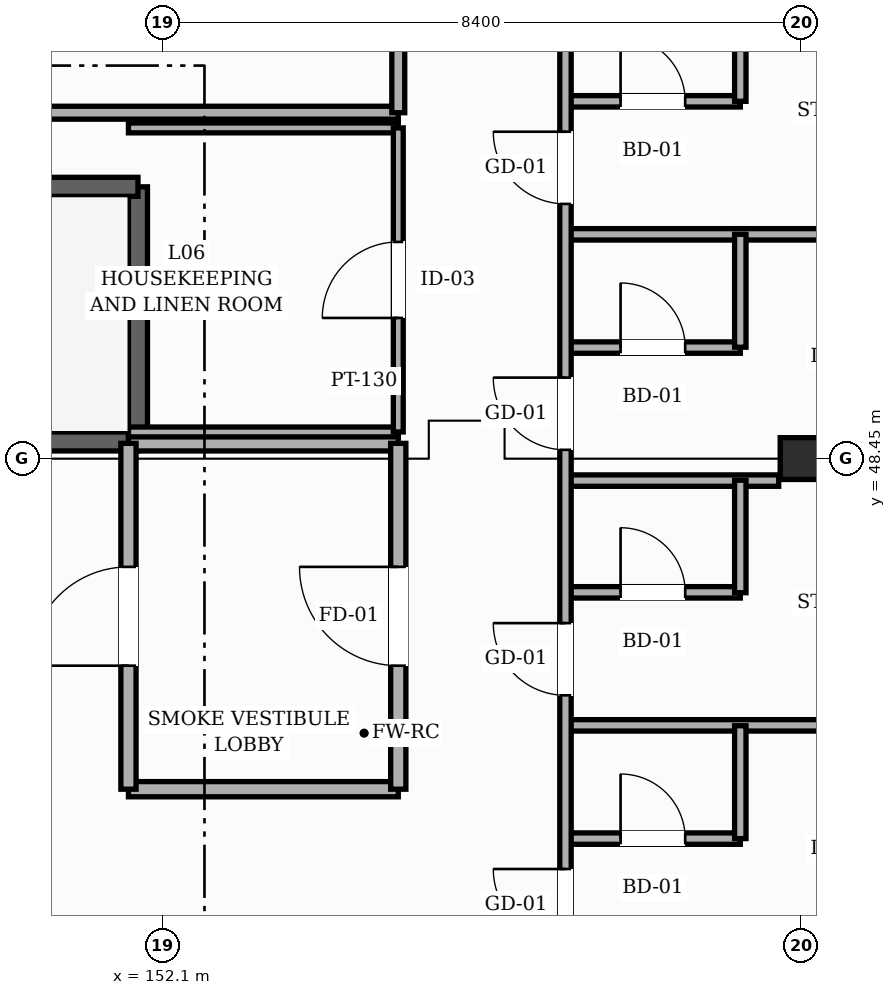
"""IFC4 building model, lengths in metres.
Left out: names, types, materials, properties, quantities, classifications, styles, units other than length and angle.
Written with IfcOpenShell. Run it as: python <this file> out.ifc"""

import sys

from ifc_helpers import new_model, si_unit, direction, frame, frame_2d, origin, origin_2d, place, context, subcontext, project, spatial, rectangle, hollow_rectangle, extrude, element, fill, save


model = new_model("IFC4")
c1 = context("Model", 3, precision=1e-05, world=origin(), true_north=direction((0.0, 1.0)))
c2 = subcontext(c1, "Body", "Model", "MODEL_VIEW")
j1 = project(units=[si_unit("LENGTHUNIT", "METRE"), si_unit("PLANEANGLEUNIT", "RADIAN")], contexts=[c1])
p1 = place(None, origin())
s1 = spatial("IfcSite", under=j1, at=p1, CompositionType="ELEMENT")
p2 = place(p1, origin())
s2 = spatial("IfcBuilding", under=s1, at=p2, CompositionType="ELEMENT")
p3 = place(p2, frame((0.0, 0.0, 28.2)))
s3 = spatial("IfcBuildingStorey", under=s2, at=p3, CompositionType="ELEMENT", Elevation=28.2)
p4 = place(p3, frame((160.5, 48.45, 0.0), z_axis=(0.0, 0.0, 1.0), x_axis=(1.0, 0.0, 0.0)))
e1 = element("IfcColumn", 1, at=p4, inside=s3, PredefinedType="COLUMN", context=c2, shape_type="SweptSolid", body=[
    extrude(hollow_rectangle(XDim=0.55, YDim=0.55, WallThickness=0.022, InnerFilletRadius=0.022, OuterFilletRadius=0.044, at=origin_2d()), origin(), (0.0, 0.0, 1.0), 3.6),
])
p5 = place(p3, frame((151.775, 52.025, 0.0), z_axis=(0.0, 0.0, 1.0), x_axis=(0.0, -1.0, 0.0)))
e2 = element("IfcWall", 2, at=p5, inside=s3, PredefinedType="SHEAR", context=c2, shape_type="SweptSolid", body=[
    extrude(rectangle(XDim=3.35, YDim=0.25, at=frame_2d((1.675, 0.0))), origin(), (0.0, 0.0, 1.0), 3.38),
])
p6 = place(p3, frame((151.775, 48.675, 0.0), z_axis=(0.0, 0.0, 1.0), x_axis=(-1.0, 0.0, 0.0)))
e3 = element("IfcWall", 3, at=p6, inside=s3, PredefinedType="SHEAR", context=c2, shape_type="SweptSolid", body=[
    extrude(rectangle(XDim=7.9, YDim=0.25, at=frame_2d((3.95, 0.0))), origin(), (0.0, 0.0, 1.0), 3.38),
])
p7 = place(p6, frame((6.075, 0.0, 0.0)))
e4 = element("IfcOpeningElement", 4, at=p7, cuts=e3, PredefinedType="OPENING", context=c2, shape_type="SweptSolid", body=[
    extrude(rectangle(XDim=1.3, YDim=2.2, at=frame_2d((0.65, 1.1))), frame((0.0, 0.135, 0.0), z_axis=(0.0, -1.0, 0.0), x_axis=(1.0, 0.0, 0.0)), (0.0, 0.0, 1.0), 0.27),
])
p8 = place(p3, frame((143.875, 52.025, 0.0), z_axis=(0.0, 0.0, 1.0), x_axis=(1.0, 0.0, 0.0)))
e5 = element("IfcWall", 5, at=p8, inside=s3, PredefinedType="SHEAR", context=c2, shape_type="SweptSolid", body=[
    extrude(rectangle(XDim=7.9, YDim=0.25, at=frame_2d((3.95, 0.0))), origin(), (0.0, 0.0, 1.0), 3.38),
])
p9 = place(p3, frame((157.4, 43.45, 0.0), z_axis=(0.0, 0.0, 1.0), x_axis=(1.0, 0.0, 0.0)))
e6 = element("IfcWall", 6, at=p9, inside=s3, PredefinedType="PARTITIONING", context=c2, shape_type="SweptSolid", body=[
    extrude(rectangle(XDim=2.3, YDim=0.15, at=frame_2d((1.15, 0.0))), origin(), (0.0, 0.0, 1.0), 3.365),
])
p10 = place(p9, frame((0.725, 0.0, 0.0)))
e7 = element("IfcOpeningElement", 7, at=p10, cuts=e6, PredefinedType="OPENING", context=c2, shape_type="SweptSolid", body=[
    extrude(rectangle(XDim=0.85, YDim=2.1, at=frame_2d((0.425, 1.05))), frame((0.0, 0.085, 0.0), z_axis=(0.0, -1.0, 0.0), x_axis=(1.0, 0.0, 0.0)), (0.0, 0.0, 1.0), 0.17),
])
p11 = place(p3, frame((151.65, 44.1, 0.0), z_axis=(0.0, 0.0, 1.0), x_axis=(1.0, 0.0, 0.0)))
e8 = element("IfcWall", 8, at=p11, inside=s3, PredefinedType="SOLIDWALL", context=c2, shape_type="SweptSolid", body=[
    extrude(rectangle(XDim=3.55, YDim=0.2, at=frame_2d((1.775, 0.0))), origin(), (0.0, 0.0, 1.0), 3.365),
])
p12 = place(p3, frame((157.4, 44.94, 0.0), z_axis=(0.0, 0.0, 1.0), x_axis=(1.0, 0.0, 0.0)))
e9 = element("IfcWall", 9, at=p12, inside=s3, PredefinedType="PARTITIONING", context=c2, shape_type="SweptSolid", body=[
    extrude(rectangle(XDim=9.8, YDim=0.15, at=frame_2d((4.9, 0.0))), origin(), (0.0, 0.0, 1.0), 3.055),
])
p13 = place(p3, frame((157.4, 46.69, 0.0), z_axis=(0.0, 0.0, 1.0), x_axis=(1.0, 0.0, 0.0)))
e10 = element("IfcWall", 10, at=p13, inside=s3, PredefinedType="PARTITIONING", context=c2, shape_type="SweptSolid", body=[
    extrude(rectangle(XDim=2.3, YDim=0.15, at=frame_2d((1.15, 0.0))), origin(), (0.0, 0.0, 1.0), 3.365),
])
p14 = place(p13, frame((0.725, 0.0, 0.0)))
e11 = element("IfcOpeningElement", 11, at=p14, cuts=e10, PredefinedType="OPENING", context=c2, shape_type="SweptSolid", body=[
    extrude(rectangle(XDim=0.85, YDim=2.1, at=frame_2d((0.425, 1.05))), frame((0.0, 0.085, 0.0), z_axis=(0.0, -1.0, 0.0), x_axis=(1.0, 0.0, 0.0)), (0.0, 0.0, 1.0), 0.17),
])
p15 = place(p3, frame((157.4, 48.16, 0.0), z_axis=(0.0, 0.0, 1.0), x_axis=(1.0, 0.0, 0.0)))
e12 = element("IfcWall", 12, at=p15, inside=s3, PredefinedType="PARTITIONING", context=c2, shape_type="SweptSolid", body=[
    extrude(rectangle(XDim=2.805, YDim=0.15, at=frame_2d((1.403, 0.0))), origin(), (0.0, 0.0, 1.0), 3.365),
])
p16 = place(p3, frame((151.65, 48.65, 0.0), z_axis=(0.0, 0.0, 1.0), x_axis=(1.0, 0.0, 0.0)))
e13 = element("IfcWall", 13, at=p16, inside=s3, PredefinedType="SOLIDWALL", context=c2, shape_type="SweptSolid", body=[
    extrude(rectangle(XDim=3.55, YDim=0.2, at=frame_2d((1.775, 0.0))), origin(), (0.0, 0.0, 1.0), 3.365),
])
p17 = place(p3, frame((151.65, 48.8, 0.0), z_axis=(0.0, 0.0, 1.0), x_axis=(1.0, 0.0, 0.0)))
e14 = element("IfcWall", 14, at=p17, inside=s3, PredefinedType="PARTITIONING", context=c2, shape_type="SweptSolid", body=[
    extrude(rectangle(XDim=3.55, YDim=0.13, at=frame_2d((1.775, 0.0))), origin(), (0.0, 0.0, 1.0), 3.365),
])
p18 = place(p3, frame((157.4, 49.91, 0.0), z_axis=(0.0, 0.0, 1.0), x_axis=(1.0, 0.0, 0.0)))
e15 = element("IfcWall", 15, at=p18, inside=s3, PredefinedType="PARTITIONING", context=c2, shape_type="SweptSolid", body=[
    extrude(rectangle(XDim=2.3, YDim=0.15, at=frame_2d((1.15, 0.0))), origin(), (0.0, 0.0, 1.0), 3.365),
])
p19 = place(p18, frame((0.725, 0.0, 0.0)))
e16 = element("IfcOpeningElement", 16, at=p19, cuts=e15, PredefinedType="OPENING", context=c2, shape_type="SweptSolid", body=[
    extrude(rectangle(XDim=0.85, YDim=2.1, at=frame_2d((0.425, 1.05))), frame((0.0, 0.085, 0.0), z_axis=(0.0, -1.0, 0.0), x_axis=(1.0, 0.0, 0.0)), (0.0, 0.0, 1.0), 0.17),
])
p20 = place(p3, frame((157.4, 51.4, 0.0), z_axis=(0.0, 0.0, 1.0), x_axis=(1.0, 0.0, 0.0)))
e17 = element("IfcWall", 17, at=p20, inside=s3, PredefinedType="PARTITIONING", context=c2, shape_type="SweptSolid", body=[
    extrude(rectangle(XDim=9.8, YDim=0.15, at=frame_2d((4.9, 0.0))), origin(), (0.0, 0.0, 1.0), 3.365),
])
p21 = place(p3, frame((151.65, 52.8, 0.0), z_axis=(0.0, 0.0, 1.0), x_axis=(1.0, 0.0, 0.0)))
e18 = element("IfcWall", 18, at=p21, inside=s3, PredefinedType="PARTITIONING", context=c2, shape_type="SweptSolid", body=[
    extrude(rectangle(XDim=3.55, YDim=0.13, at=frame_2d((1.775, 0.0))), origin(), (0.0, 0.0, 1.0), 3.365),
])
p22 = place(p3, frame((144.8, 53.0, 0.0), z_axis=(0.0, 0.0, 1.0), x_axis=(1.0, 0.0, 0.0)))
e19 = element("IfcWall", 19, at=p22, inside=s3, PredefinedType="PARTITIONING", context=c2, shape_type="SweptSolid", body=[
    extrude(rectangle(XDim=10.4, YDim=0.17, at=frame_2d((5.2, 0.0))), origin(), (0.0, 0.0, 1.0), 3.365),
])
p23 = place(p3, frame((157.4, 53.15, 0.0), z_axis=(0.0, 0.0, 1.0), x_axis=(1.0, 0.0, 0.0)))
e20 = element("IfcWall", 20, at=p23, inside=s3, PredefinedType="PARTITIONING", context=c2, shape_type="SweptSolid", body=[
    extrude(rectangle(XDim=2.3, YDim=0.15, at=frame_2d((1.15, 0.0))), origin(), (0.0, 0.0, 1.0), 3.365),
])
p24 = place(p23, frame((0.725, 0.0, 0.0)))
e21 = element("IfcOpeningElement", 21, at=p24, cuts=e20, PredefinedType="OPENING", context=c2, shape_type="SweptSolid", body=[
    extrude(rectangle(XDim=0.85, YDim=2.1, at=frame_2d((0.425, 1.05))), frame((0.0, 0.085, 0.0), z_axis=(0.0, -1.0, 0.0), x_axis=(1.0, 0.0, 0.0)), (0.0, 0.0, 1.0), 0.17),
])
p25 = place(p3, frame((151.65, 44.1, 0.0), z_axis=(0.0, 0.0, 1.0), x_axis=(0.0, 1.0, 0.0)))
e22 = element("IfcWall", 22, at=p25, inside=s3, PredefinedType="SOLIDWALL", context=c2, shape_type="SweptSolid", body=[
    extrude(rectangle(XDim=4.55, YDim=0.2, at=frame_2d((2.275, 0.0))), origin(), (0.0, 0.0, 1.0), 3.365),
])
p26 = place(p25, frame((1.625, 0.0, 0.0)))
e23 = element("IfcOpeningElement", 23, at=p26, cuts=e22, PredefinedType="OPENING", context=c2, shape_type="SweptSolid", body=[
    extrude(rectangle(XDim=1.3, YDim=2.2, at=frame_2d((0.65, 1.1))), frame((0.0, 0.11, 0.0), z_axis=(0.0, -1.0, 0.0), x_axis=(1.0, 0.0, 0.0)), (0.0, 0.0, 1.0), 0.22),
])
p27 = place(p3, frame((155.2, 44.1, 0.0), z_axis=(0.0, 0.0, 1.0), x_axis=(0.0, 1.0, 0.0)))
e24 = element("IfcWall", 24, at=p27, inside=s3, PredefinedType="SOLIDWALL", context=c2, shape_type="SweptSolid", body=[
    extrude(rectangle(XDim=4.55, YDim=0.2, at=frame_2d((2.275, 0.0))), origin(), (0.0, 0.0, 1.0), 3.365),
])
p28 = place(p27, frame((1.625, 0.0, 0.0)))
e25 = element("IfcOpeningElement", 25, at=p28, cuts=e24, PredefinedType="OPENING", context=c2, shape_type="SweptSolid", body=[
    extrude(rectangle(XDim=1.3, YDim=2.2, at=frame_2d((0.65, 1.1))), frame((0.0, 0.11, 0.0), z_axis=(0.0, -1.0, 0.0), x_axis=(1.0, 0.0, 0.0)), (0.0, 0.0, 1.0), 0.22),
])
p29 = place(p3, frame((155.2, 48.8, 0.0), z_axis=(0.0, 0.0, 1.0), x_axis=(0.0, 1.0, 0.0)))
e26 = element("IfcWall", 26, at=p29, inside=s3, PredefinedType="PARTITIONING", context=c2, shape_type="SweptSolid", body=[
    extrude(rectangle(XDim=4.0, YDim=0.13, at=frame_2d((2.0, 0.0))), origin(), (0.0, 0.0, 1.0), 3.365),
])
p30 = place(p29, frame((1.5, 0.0, 0.0)))
e27 = element("IfcOpeningElement", 27, at=p30, cuts=e26, PredefinedType="OPENING", context=c2, shape_type="SweptSolid", body=[
    extrude(rectangle(XDim=1.0, YDim=2.18, at=frame_2d((0.5, 1.09))), frame((0.0, 0.075, 0.0), z_axis=(0.0, -1.0, 0.0), x_axis=(1.0, 0.0, 0.0)), (0.0, 0.0, 1.0), 0.15),
])
p31 = place(p3, frame((155.2, 53.0, 0.0), z_axis=(0.0, 0.0, 1.0), x_axis=(0.0, 1.0, 0.0)))
e28 = element("IfcWall", 28, at=p31, inside=s3, PredefinedType="PARTITIONING", context=c2, shape_type="SweptSolid", body=[
    extrude(rectangle(XDim=6.45, YDim=0.17, at=frame_2d((3.225, 0.0))), origin(), (0.0, 0.0, 1.0), 3.365),
])
p32 = place(p31, frame((2.625, 0.0, 0.0)))
e29 = element("IfcOpeningElement", 29, at=p32, cuts=e28, PredefinedType="OPENING", context=c2, shape_type="SweptSolid", body=[
    extrude(rectangle(XDim=1.2, YDim=2.2, at=frame_2d((0.6, 1.1))), frame((0.0, 0.095, 0.0), z_axis=(0.0, -1.0, 0.0), x_axis=(1.0, 0.0, 0.0)), (0.0, 0.0, 1.0), 0.19),
])
p33 = place(p3, frame((157.4, 22.3, 0.0), z_axis=(0.0, 0.0, 1.0), x_axis=(0.0, 1.0, 0.0)))
e30 = element("IfcWall", 30, at=p33, inside=s3, PredefinedType="PARTITIONING", context=c2, shape_type="SweptSolid", body=[
    extrude(rectangle(XDim=48.5, YDim=0.15, at=frame_2d((24.25, 0.0))), origin(), (0.0, 0.0, 1.0), 3.365),
])
p34 = place(p33, frame((0.325, 0.0, 0.0)))
e31 = element("IfcOpeningElement", 31, at=p34, cuts=e30, PredefinedType="OPENING", context=c2, shape_type="SweptSolid", body=[
    extrude(rectangle(XDim=1.1, YDim=2.2, at=frame_2d((0.55, 1.1))), frame((0.0, 0.085, 0.0), z_axis=(0.0, -1.0, 0.0), x_axis=(1.0, 0.0, 0.0)), (0.0, 0.0, 1.0), 0.17),
])
p35 = place(p33, frame((3.635, 0.0, 0.0)))
e32 = element("IfcOpeningElement", 32, at=p35, cuts=e30, PredefinedType="OPENING", context=c2, shape_type="SweptSolid", body=[
    extrude(rectangle(XDim=0.95, YDim=2.15, at=frame_2d((0.475, 1.075))), frame((0.0, 0.085, 0.0), z_axis=(0.0, -1.0, 0.0), x_axis=(1.0, 0.0, 0.0)), (0.0, 0.0, 1.0), 0.17),
])
p36 = place(p33, frame((6.865, 0.0, 0.0)))
e33 = element("IfcOpeningElement", 33, at=p36, cuts=e30, PredefinedType="OPENING", context=c2, shape_type="SweptSolid", body=[
    extrude(rectangle(XDim=0.95, YDim=2.15, at=frame_2d((0.475, 1.075))), frame((0.0, 0.085, 0.0), z_axis=(0.0, -1.0, 0.0), x_axis=(1.0, 0.0, 0.0)), (0.0, 0.0, 1.0), 0.17),
])
p37 = place(p33, frame((10.1, 0.0, 0.0)))
e34 = element("IfcOpeningElement", 34, at=p37, cuts=e30, PredefinedType="OPENING", context=c2, shape_type="SweptSolid", body=[
    extrude(rectangle(XDim=0.95, YDim=2.15, at=frame_2d((0.475, 1.075))), frame((0.0, 0.085, 0.0), z_axis=(0.0, -1.0, 0.0), x_axis=(1.0, 0.0, 0.0)), (0.0, 0.0, 1.0), 0.17),
])
p38 = place(p33, frame((13.335, 0.0, 0.0)))
e35 = element("IfcOpeningElement", 35, at=p38, cuts=e30, PredefinedType="OPENING", context=c2, shape_type="SweptSolid", body=[
    extrude(rectangle(XDim=0.95, YDim=2.15, at=frame_2d((0.475, 1.075))), frame((0.0, 0.085, 0.0), z_axis=(0.0, -1.0, 0.0), x_axis=(1.0, 0.0, 0.0)), (0.0, 0.0, 1.0), 0.17),
])
p39 = place(p33, frame((16.565, 0.0, 0.0)))
e36 = element("IfcOpeningElement", 36, at=p39, cuts=e30, PredefinedType="OPENING", context=c2, shape_type="SweptSolid", body=[
    extrude(rectangle(XDim=0.95, YDim=2.15, at=frame_2d((0.475, 1.075))), frame((0.0, 0.085, 0.0), z_axis=(0.0, -1.0, 0.0), x_axis=(1.0, 0.0, 0.0)), (0.0, 0.0, 1.0), 0.17),
])
p40 = place(p33, frame((19.8, 0.0, 0.0)))
e37 = element("IfcOpeningElement", 37, at=p40, cuts=e30, PredefinedType="OPENING", context=c2, shape_type="SweptSolid", body=[
    extrude(rectangle(XDim=0.95, YDim=2.15, at=frame_2d((0.475, 1.075))), frame((0.0, 0.085, 0.0), z_axis=(0.0, -1.0, 0.0), x_axis=(1.0, 0.0, 0.0)), (0.0, 0.0, 1.0), 0.17),
])
p41 = place(p33, frame((23.035, 0.0, 0.0)))
e38 = element("IfcOpeningElement", 38, at=p41, cuts=e30, PredefinedType="OPENING", context=c2, shape_type="SweptSolid", body=[
    extrude(rectangle(XDim=0.95, YDim=2.15, at=frame_2d((0.475, 1.075))), frame((0.0, 0.085, 0.0), z_axis=(0.0, -1.0, 0.0), x_axis=(1.0, 0.0, 0.0)), (0.0, 0.0, 1.0), 0.17),
])
p42 = place(p33, frame((26.265, 0.0, 0.0)))
e39 = element("IfcOpeningElement", 39, at=p42, cuts=e30, PredefinedType="OPENING", context=c2, shape_type="SweptSolid", body=[
    extrude(rectangle(XDim=0.95, YDim=2.15, at=frame_2d((0.475, 1.075))), frame((0.0, 0.085, 0.0), z_axis=(0.0, -1.0, 0.0), x_axis=(1.0, 0.0, 0.0)), (0.0, 0.0, 1.0), 0.17),
])
p43 = place(p33, frame((29.5, 0.0, 0.0)))
e40 = element("IfcOpeningElement", 40, at=p43, cuts=e30, PredefinedType="OPENING", context=c2, shape_type="SweptSolid", body=[
    extrude(rectangle(XDim=0.95, YDim=2.15, at=frame_2d((0.475, 1.075))), frame((0.0, 0.085, 0.0), z_axis=(0.0, -1.0, 0.0), x_axis=(1.0, 0.0, 0.0)), (0.0, 0.0, 1.0), 0.17),
])
p44 = place(p33, frame((32.735, 0.0, 0.0)))
e41 = element("IfcOpeningElement", 41, at=p44, cuts=e30, PredefinedType="OPENING", context=c2, shape_type="SweptSolid", body=[
    extrude(rectangle(XDim=0.95, YDim=2.15, at=frame_2d((0.475, 1.075))), frame((0.0, 0.085, 0.0), z_axis=(0.0, -1.0, 0.0), x_axis=(1.0, 0.0, 0.0)), (0.0, 0.0, 1.0), 0.17),
])
p45 = place(p33, frame((35.965, 0.0, 0.0)))
e42 = element("IfcOpeningElement", 42, at=p45, cuts=e30, PredefinedType="OPENING", context=c2, shape_type="SweptSolid", body=[
    extrude(rectangle(XDim=0.95, YDim=2.15, at=frame_2d((0.475, 1.075))), frame((0.0, 0.085, 0.0), z_axis=(0.0, -1.0, 0.0), x_axis=(1.0, 0.0, 0.0)), (0.0, 0.0, 1.0), 0.17),
])
p46 = place(p33, frame((39.2, 0.0, 0.0)))
e43 = element("IfcOpeningElement", 43, at=p46, cuts=e30, PredefinedType="OPENING", context=c2, shape_type="SweptSolid", body=[
    extrude(rectangle(XDim=0.95, YDim=2.15, at=frame_2d((0.475, 1.075))), frame((0.0, 0.085, 0.0), z_axis=(0.0, -1.0, 0.0), x_axis=(1.0, 0.0, 0.0)), (0.0, 0.0, 1.0), 0.17),
])
p47 = place(p33, frame((42.435, 0.0, 0.0)))
e44 = element("IfcOpeningElement", 44, at=p47, cuts=e30, PredefinedType="OPENING", context=c2, shape_type="SweptSolid", body=[
    extrude(rectangle(XDim=0.95, YDim=2.15, at=frame_2d((0.475, 1.075))), frame((0.0, 0.085, 0.0), z_axis=(0.0, -1.0, 0.0), x_axis=(1.0, 0.0, 0.0)), (0.0, 0.0, 1.0), 0.17),
])
p48 = place(p33, frame((45.665, 0.0, 0.0)))
e45 = element("IfcOpeningElement", 45, at=p48, cuts=e30, PredefinedType="OPENING", context=c2, shape_type="SweptSolid", body=[
    extrude(rectangle(XDim=0.95, YDim=2.15, at=frame_2d((0.475, 1.075))), frame((0.0, 0.085, 0.0), z_axis=(0.0, -1.0, 0.0), x_axis=(1.0, 0.0, 0.0)), (0.0, 0.0, 1.0), 0.17),
])
p49 = place(p3, frame((159.7, 43.45, 0.0), z_axis=(0.0, 0.0, 1.0), x_axis=(0.0, 1.0, 0.0)))
e46 = element("IfcWall", 46, at=p49, inside=s3, PredefinedType="PARTITIONING", context=c2, shape_type="SweptSolid", body=[
    extrude(rectangle(XDim=1.485, YDim=0.15, at=frame_2d((0.743, 0.0))), origin(), (0.0, 0.0, 1.0), 3.365),
])
p50 = place(p3, frame((159.7, 46.685, 0.0), z_axis=(0.0, 0.0, 1.0), x_axis=(0.0, 1.0, 0.0)))
e47 = element("IfcWall", 47, at=p50, inside=s3, PredefinedType="PARTITIONING", context=c2, shape_type="SweptSolid", body=[
    extrude(rectangle(XDim=1.48, YDim=0.15, at=frame_2d((0.74, 0.0))), origin(), (0.0, 0.0, 1.0), 3.365),
])
p51 = place(p3, frame((159.7, 49.915, 0.0), z_axis=(0.0, 0.0, 1.0), x_axis=(0.0, 1.0, 0.0)))
e48 = element("IfcWall", 48, at=p51, inside=s3, PredefinedType="PARTITIONING", context=c2, shape_type="SweptSolid", body=[
    extrude(rectangle(XDim=1.485, YDim=0.15, at=frame_2d((0.742, 0.0))), origin(), (0.0, 0.0, 1.0), 3.365),
])
p52 = place(p3, frame((159.7, 53.15, 0.0), z_axis=(0.0, 0.0, 1.0), x_axis=(0.0, 1.0, 0.0)))
e49 = element("IfcWall", 49, at=p52, inside=s3, PredefinedType="PARTITIONING", context=c2, shape_type="SweptSolid", body=[
    extrude(rectangle(XDim=1.485, YDim=0.15, at=frame_2d((0.743, 0.0))), origin(), (0.0, 0.0, 1.0), 3.365),
])
p53 = place(p26, origin())
e50 = element("IfcDoor", 50, at=p53, inside=s3, OperationType="SINGLE_SWING_LEFT", PredefinedType="DOOR", context=c2, shape_type="SweptSolid", body=[
    extrude(rectangle(XDim=1.3, YDim=2.2, at=frame_2d((0.65, 1.1))), frame((0.0, 0.025, 0.0), z_axis=(0.0, -1.0, 0.0), x_axis=(1.0, 0.0, 0.0)), (0.0, 0.0, 1.0), 0.05),
])
fill(e23, e50)
p54 = place(p28, origin())
e51 = element("IfcDoor", 51, at=p54, inside=s3, OperationType="SINGLE_SWING_RIGHT", PredefinedType="DOOR", context=c2, shape_type="SweptSolid", body=[
    extrude(rectangle(XDim=1.3, YDim=2.2, at=frame_2d((0.65, 1.1))), frame((0.0, 0.025, 0.0), z_axis=(0.0, -1.0, 0.0), x_axis=(1.0, 0.0, 0.0)), (0.0, 0.0, 1.0), 0.05),
])
fill(e25, e51)
p55 = place(p30, origin())
e52 = element("IfcDoor", 52, at=p55, inside=s3, OperationType="SINGLE_SWING_LEFT", PredefinedType="DOOR", context=c2, shape_type="SweptSolid", body=[
    extrude(rectangle(XDim=1.0, YDim=2.18, at=frame_2d((0.5, 1.09))), frame((0.0, 0.025, 0.0), z_axis=(0.0, -1.0, 0.0), x_axis=(1.0, 0.0, 0.0)), (0.0, 0.0, 1.0), 0.05),
])
fill(e27, e52)
p56 = place(p40, origin())
e53 = element("IfcDoor", 53, at=p56, inside=s3, OperationType="SINGLE_SWING_RIGHT", PredefinedType="DOOR", context=c2, shape_type="SweptSolid", body=[
    extrude(rectangle(XDim=0.95, YDim=2.15, at=frame_2d((0.475, 1.075))), frame((0.0, 0.025, 0.0), z_axis=(0.0, -1.0, 0.0), x_axis=(1.0, 0.0, 0.0)), (0.0, 0.0, 1.0), 0.05),
])
fill(e37, e53)
p57 = place(p10, origin())
e54 = element("IfcDoor", 54, at=p57, inside=s3, OperationType="SINGLE_SWING_LEFT", PredefinedType="DOOR", context=c2, shape_type="SweptSolid", body=[
    extrude(rectangle(XDim=0.85, YDim=2.1, at=frame_2d((0.425, 1.05))), frame((0.0, 0.025, 0.0), z_axis=(0.0, -1.0, 0.0), x_axis=(1.0, 0.0, 0.0)), (0.0, 0.0, 1.0), 0.05),
])
fill(e7, e54)
p58 = place(p41, origin())
e55 = element("IfcDoor", 55, at=p58, inside=s3, OperationType="SINGLE_SWING_RIGHT", PredefinedType="DOOR", context=c2, shape_type="SweptSolid", body=[
    extrude(rectangle(XDim=0.95, YDim=2.15, at=frame_2d((0.475, 1.075))), frame((0.0, 0.025, 0.0), z_axis=(0.0, -1.0, 0.0), x_axis=(1.0, 0.0, 0.0)), (0.0, 0.0, 1.0), 0.05),
])
fill(e38, e55)
p59 = place(p14, origin())
e56 = element("IfcDoor", 56, at=p59, inside=s3, OperationType="SINGLE_SWING_LEFT", PredefinedType="DOOR", context=c2, shape_type="SweptSolid", body=[
    extrude(rectangle(XDim=0.85, YDim=2.1, at=frame_2d((0.425, 1.05))), frame((0.0, 0.025, 0.0), z_axis=(0.0, -1.0, 0.0), x_axis=(1.0, 0.0, 0.0)), (0.0, 0.0, 1.0), 0.05),
])
fill(e11, e56)
p60 = place(p42, origin())
e57 = element("IfcDoor", 57, at=p60, inside=s3, OperationType="SINGLE_SWING_RIGHT", PredefinedType="DOOR", context=c2, shape_type="SweptSolid", body=[
    extrude(rectangle(XDim=0.95, YDim=2.15, at=frame_2d((0.475, 1.075))), frame((0.0, 0.025, 0.0), z_axis=(0.0, -1.0, 0.0), x_axis=(1.0, 0.0, 0.0)), (0.0, 0.0, 1.0), 0.05),
])
fill(e39, e57)
p61 = place(p19, origin())
e58 = element("IfcDoor", 58, at=p61, inside=s3, OperationType="SINGLE_SWING_LEFT", PredefinedType="DOOR", context=c2, shape_type="SweptSolid", body=[
    extrude(rectangle(XDim=0.85, YDim=2.1, at=frame_2d((0.425, 1.05))), frame((0.0, 0.025, 0.0), z_axis=(0.0, -1.0, 0.0), x_axis=(1.0, 0.0, 0.0)), (0.0, 0.0, 1.0), 0.05),
])
fill(e16, e58)
p62 = place(p43, origin())
e59 = element("IfcDoor", 59, at=p62, inside=s3, OperationType="SINGLE_SWING_RIGHT", PredefinedType="DOOR", context=c2, shape_type="SweptSolid", body=[
    extrude(rectangle(XDim=0.95, YDim=2.15, at=frame_2d((0.475, 1.075))), frame((0.0, 0.025, 0.0), z_axis=(0.0, -1.0, 0.0), x_axis=(1.0, 0.0, 0.0)), (0.0, 0.0, 1.0), 0.05),
])
fill(e40, e59)
p63 = place(p24, origin())
e60 = element("IfcDoor", 60, at=p63, inside=s3, OperationType="SINGLE_SWING_LEFT", PredefinedType="DOOR", context=c2, shape_type="SweptSolid", body=[
    extrude(rectangle(XDim=0.85, YDim=2.1, at=frame_2d((0.425, 1.05))), frame((0.0, 0.025, 0.0), z_axis=(0.0, -1.0, 0.0), x_axis=(1.0, 0.0, 0.0)), (0.0, 0.0, 1.0), 0.05),
])
fill(e21, e60)
save(model, sys.argv[1])
